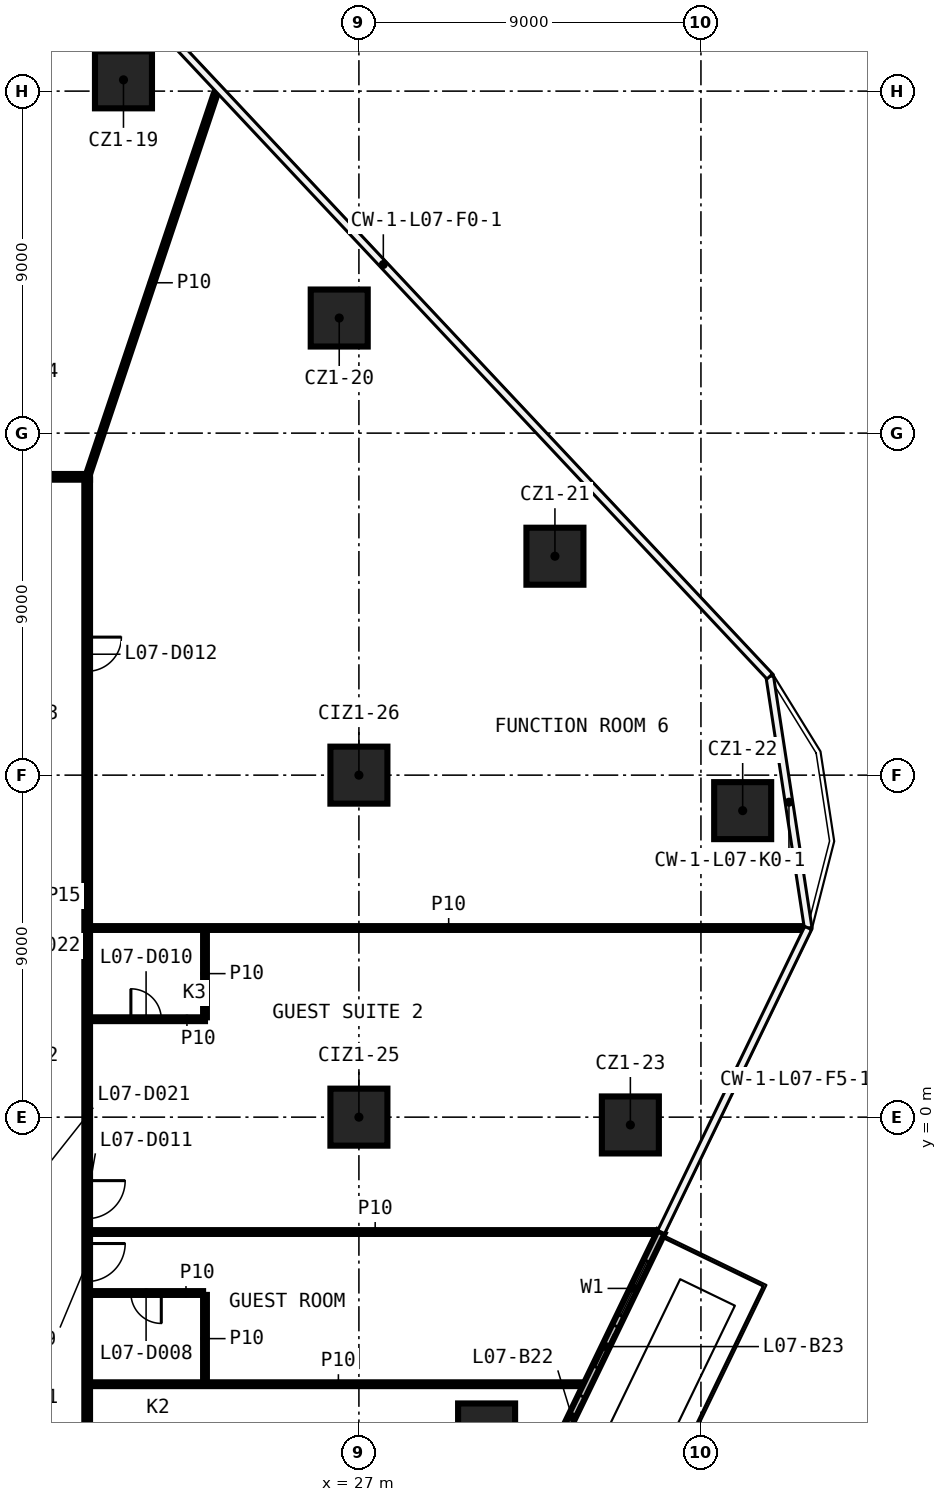
"""IFC4 building model, lengths in metres.
Left out: names, types, materials, properties, quantities, classifications, styles, units other than length and angle.
Written with IfcOpenShell. Run it as: python <this file> out.ifc"""

import sys

from ifc_helpers import new_model, si_unit, direction, frame, frame_2d, origin, origin_2d, place, context, subcontext, project, spatial, rectangle, extrude, element, fill, save


model = new_model("IFC4")
c1 = context("Model", 3, precision=1e-05, world=origin(), true_north=direction((0.0, 1.0)))
c2 = subcontext(c1, "Body", "Model", "MODEL_VIEW")
j1 = project(units=[si_unit("LENGTHUNIT", "METRE"), si_unit("PLANEANGLEUNIT", "RADIAN")], contexts=[c1])
p1 = place(None, origin())
s1 = spatial("IfcSite", under=j1, at=p1, CompositionType="ELEMENT")
p2 = place(p1, origin())
s2 = spatial("IfcBuilding", under=s1, at=p2, CompositionType="ELEMENT")
p3 = place(p2, frame((0.0, 0.0, 47.7)))
s3 = spatial("IfcBuildingStorey", under=s2, at=p3, CompositionType="ELEMENT", Elevation=47.7)
for number, where, z_axis, x_axis in (
    (1, (20.805, 27.297, 0.0), (0.0, 0.0, 1.0), (1.0, 0.0, 0.0)),
    (2, (26.482, 21.029, 0.0), (0.0, 0.0, 1.0), (1.0, 0.0, 0.0)),
    (3, (32.158, 14.761, 0.0), (0.0, 0.0, 1.0), (1.0, 0.0, 0.0)),
    (4, (37.098, 8.066, 0.0), (0.0, 0.0, 1.0), (1.0, 0.0, 0.0)),
    (5, (34.143, -0.205, 0.0), (0.0, 0.0, 1.0), (1.0, 0.0, 0.0)),
    (6, (30.36, -8.284, 0.0), (0.0, 0.0, 1.0), (1.0, 0.0, 0.0)),
    (7, (27.0, 0.0, 0.0), (0.0, 0.0, 1.0), (1.0, 0.0, 0.0)),
    (8, (27.0, 9.0, 0.0), (0.0, 0.0, 1.0), (1.0, 0.0, 0.0)),
):
    element("IfcColumn", number, at=place(p3, frame(where, z_axis=z_axis, x_axis=x_axis)), inside=s3, PredefinedType="COLUMN", context=c2, shape_type="SweptSolid", body=[
        extrude(rectangle(XDim=1.5, YDim=1.5, at=origin_2d()), origin(), (0.0, 0.0, 1.0), 3.3),
    ])
p4 = place(p3, frame((19.925, -7.028, 0.0), z_axis=(0.0, 0.0, 1.0), x_axis=(1.0, 0.0, 0.0)))
e9 = element("IfcWall", 9, at=p4, inside=s3, PredefinedType="PARTITIONING", context=c2, shape_type="SweptSolid", body=[
    extrude(rectangle(XDim=13.071, YDim=0.1, at=frame_2d((6.535, 0.0))), origin(), (0.0, 0.0, 1.0), 3.3),
])
p5 = place(p3, frame((22.9, -4.628, 0.0), z_axis=(0.0, 0.0, 1.0), x_axis=(-1.0, 0.0, 0.0)))
e10 = element("IfcWall", 10, at=p5, inside=s3, PredefinedType="PARTITIONING", context=c2, shape_type="SweptSolid", body=[
    extrude(rectangle(XDim=2.975, YDim=0.1, at=frame_2d((1.487, 0.0))), origin(), (0.0, 0.0, 1.0), 3.3),
])
p6 = place(p5, frame((1.1, 0.0, 0.0)))
e11 = element("IfcOpeningElement", 11, at=p6, cuts=e10, PredefinedType="OPENING", context=c2, shape_type="SweptSolid", body=[
    extrude(rectangle(XDim=0.8, YDim=2.1, at=frame_2d((0.4, 1.05))), frame((0.0, 0.06, 0.0), z_axis=(0.0, -1.0, 0.0), x_axis=(1.0, 0.0, 0.0)), (0.0, 0.0, 1.0), 0.12),
])
p7 = place(p3, frame((19.925, -3.023, 0.0), z_axis=(0.0, 0.0, 1.0), x_axis=(1.0, 0.0, 0.0)))
e12 = element("IfcWall", 12, at=p7, inside=s3, PredefinedType="PARTITIONING", context=c2, shape_type="SweptSolid", body=[
    extrude(rectangle(XDim=15.006, YDim=0.1, at=frame_2d((7.503, 0.0))), origin(), (0.0, 0.0, 1.0), 3.3),
])
p8 = place(p3, frame((19.925, 2.577, 0.0), z_axis=(0.0, 0.0, 1.0), x_axis=(1.0, 0.0, 0.0)))
e13 = element("IfcWall", 13, at=p8, inside=s3, PredefinedType="PARTITIONING", context=c2, shape_type="SweptSolid", body=[
    extrude(rectangle(XDim=3.025, YDim=0.1, at=frame_2d((1.512, 0.0))), origin(), (0.0, 0.0, 1.0), 3.3),
])
p9 = place(p8, frame((1.075, 0.0, 0.0)))
e14 = element("IfcOpeningElement", 14, at=p9, cuts=e13, PredefinedType="OPENING", context=c2, shape_type="SweptSolid", body=[
    extrude(rectangle(XDim=0.8, YDim=2.1, at=frame_2d((0.4, 1.05))), frame((0.0, 0.06, 0.0), z_axis=(0.0, -1.0, 0.0), x_axis=(1.0, 0.0, 0.0)), (0.0, 0.0, 1.0), 0.12),
])
p10 = place(p3, frame((19.925, 4.977, 0.0), z_axis=(0.0, 0.0, 1.0), x_axis=(1.0, 0.0, 0.0)))
e15 = element("IfcWall", 15, at=p10, inside=s3, PredefinedType="PARTITIONING", context=c2, shape_type="SweptSolid", body=[
    extrude(rectangle(XDim=18.874, YDim=0.1, at=frame_2d((9.437, 0.0))), origin(), (0.0, 0.0, 1.0), 3.3),
])
p11 = place(p3, frame((-19.925, 16.85, 0.0), z_axis=(0.0, 0.0, 1.0), x_axis=(1.0, 0.0, 0.0)))
e16 = element("IfcWall", 16, at=p11, inside=s3, PredefinedType="PARTITIONING", context=c2, shape_type="SweptSolid", body=[
    extrude(rectangle(XDim=39.85, YDim=0.15, at=frame_2d((19.925, 0.0))), origin(), (0.0, 0.0, 1.0), 3.3),
])
p12 = place(p11, frame((31.643, 0.0, 0.0)))
e17 = element("IfcOpeningElement", 17, at=p12, cuts=e16, PredefinedType="OPENING", context=c2, shape_type="SweptSolid", body=[
    extrude(rectangle(XDim=0.9, YDim=2.1, at=frame_2d((0.45, 1.05))), frame((0.0, 0.085, 0.0), z_axis=(0.0, -1.0, 0.0), x_axis=(1.0, 0.0, 0.0)), (0.0, 0.0, 1.0), 0.17),
])
p13 = place(p11, frame((22.056, 0.0, 0.0)))
e18 = element("IfcOpeningElement", 18, at=p13, cuts=e16, PredefinedType="OPENING", context=c2, shape_type="SweptSolid", body=[
    extrude(rectangle(XDim=0.9, YDim=2.1, at=frame_2d((0.45, 1.05))), frame((0.0, 0.085, 0.0), z_axis=(0.0, -1.0, 0.0), x_axis=(1.0, 0.0, 0.0)), (0.0, 0.0, 1.0), 0.17),
])
p14 = place(p11, frame((14.831, 0.0, 0.0)))
e19 = element("IfcOpeningElement", 19, at=p14, cuts=e16, PredefinedType="OPENING", context=c2, shape_type="SweptSolid", body=[
    extrude(rectangle(XDim=1.0, YDim=2.1, at=frame_2d((0.5, 1.05))), frame((0.0, 0.085, 0.0), z_axis=(0.0, -1.0, 0.0), x_axis=(1.0, 0.0, 0.0)), (0.0, 0.0, 1.0), 0.17),
])
p15 = place(p3, frame((19.85, 16.85, 0.0), z_axis=(0.0, 0.0, 1.0), x_axis=(0.317967659794, 0.948101559605, 0.0)))
e20 = element("IfcWall", 20, at=p15, inside=s3, PredefinedType="PARTITIONING", context=c2, shape_type="SweptSolid", body=[
    extrude(rectangle(XDim=10.773, YDim=0.1, at=frame_2d((5.387, 0.0))), origin(), (0.0, 0.0, 1.0), 3.3),
])
p16 = place(p3, frame((22.95, -6.978, 0.0), z_axis=(0.0, 0.0, 1.0), x_axis=(0.0, 1.0, 0.0)))
e21 = element("IfcWall", 21, at=p16, inside=s3, PredefinedType="PARTITIONING", context=c2, shape_type="SweptSolid", body=[
    extrude(rectangle(XDim=2.3, YDim=0.1, at=frame_2d((1.15, 0.0))), origin(), (0.0, 0.0, 1.0), 3.3),
])
p17 = place(p3, frame((22.95, 2.627, 0.0), z_axis=(0.0, 0.0, 1.0), x_axis=(0.0, 1.0, 0.0)))
e22 = element("IfcWall", 22, at=p17, inside=s3, PredefinedType="PARTITIONING", context=c2, shape_type="SweptSolid", body=[
    extrude(rectangle(XDim=2.3, YDim=0.1, at=frame_2d((1.15, 0.0))), origin(), (0.0, 0.0, 1.0), 3.3),
])
p18 = place(p3, frame((19.85, 16.775, 0.0), z_axis=(0.0, 0.0, 1.0), x_axis=(0.0, -1.0, 0.0)))
e23 = element("IfcWall", 23, at=p18, inside=s3, PredefinedType="PARTITIONING", context=c2, shape_type="SweptSolid", body=[
    extrude(rectangle(XDim=33.55, YDim=0.15, at=frame_2d((16.775, 0.0))), origin(), (0.0, 0.0, 1.0), 3.3),
])
p19 = place(p18, frame((29.016, 0.0, 0.0)))
e24 = element("IfcOpeningElement", 24, at=p19, cuts=e23, PredefinedType="OPENING", context=c2, shape_type="SweptSolid", body=[
    extrude(rectangle(XDim=1.0, YDim=2.1, at=frame_2d((0.5, 1.05))), frame((0.0, 0.085, 0.0), z_axis=(0.0, -1.0, 0.0), x_axis=(1.0, 0.0, 0.0)), (0.0, 0.0, 1.0), 0.17),
])
p20 = place(p18, frame((20.1, 0.0, 0.0)))
e25 = element("IfcOpeningElement", 25, at=p20, cuts=e23, PredefinedType="OPENING", context=c2, shape_type="SweptSolid", body=[
    extrude(rectangle(XDim=1.0, YDim=2.1, at=frame_2d((0.5, 1.05))), frame((0.0, 0.085, 0.0), z_axis=(0.0, -1.0, 0.0), x_axis=(1.0, 0.0, 0.0)), (0.0, 0.0, 1.0), 0.17),
])
p21 = place(p18, frame((18.446, 0.0, 0.0)))
e26 = element("IfcOpeningElement", 26, at=p21, cuts=e23, PredefinedType="OPENING", context=c2, shape_type="SweptSolid", body=[
    extrude(rectangle(XDim=1.0, YDim=2.1, at=frame_2d((0.5, 1.05))), frame((0.0, 0.085, 0.0), z_axis=(0.0, -1.0, 0.0), x_axis=(1.0, 0.0, 0.0)), (0.0, 0.0, 1.0), 0.17),
])
p22 = place(p18, frame((4.143, 0.0, 0.0)))
e27 = element("IfcOpeningElement", 27, at=p22, cuts=e23, PredefinedType="OPENING", context=c2, shape_type="SweptSolid", body=[
    extrude(rectangle(XDim=0.9, YDim=2.1, at=frame_2d((0.45, 1.05))), frame((0.0, 0.085, 0.0), z_axis=(0.0, -1.0, 0.0), x_axis=(1.0, 0.0, 0.0)), (0.0, 0.0, 1.0), 0.17),
])
p23 = place(p3, frame((23.338, -27.051, 0.0), z_axis=(0.0, 0.0, 1.0), x_axis=(0.43524886879, 0.900310181114, 0.0)))
e28 = element("IfcWall", 28, at=p23, inside=s3, PredefinedType="SOLIDWALL", context=c2, shape_type="SweptSolid", body=[
    extrude(rectangle(XDim=26.689, YDim=0.2, at=frame_2d((13.344, 0.0))), origin(), (0.0, 0.0, 1.0), 3.3),
])
p24 = place(p23, frame((0.5, 0.0, 0.6)))
e29 = element("IfcOpeningElement", 29, at=p24, cuts=e28, PredefinedType="OPENING", context=c2, shape_type="SweptSolid", body=[
    extrude(rectangle(XDim=1.6, YDim=2.4, at=frame_2d((0.8, 1.2))), frame((0.0, 0.11, 0.0), z_axis=(0.0, -1.0, 0.0), x_axis=(1.0, 0.0, 0.0)), (0.0, 0.0, 1.0), 0.22),
])
p25 = place(p23, frame((3.0, 0.0, 0.0)))
e30 = element("IfcOpeningElement", 30, at=p25, cuts=e28, PredefinedType="OPENING", context=c2, shape_type="SweptSolid", body=[
    extrude(rectangle(XDim=1.2, YDim=2.4, at=frame_2d((0.6, 1.2))), frame((0.0, 0.11, 0.0), z_axis=(0.0, -1.0, 0.0), x_axis=(1.0, 0.0, 0.0)), (0.0, 0.0, 1.0), 0.22),
])
p26 = place(p23, frame((6.448, 0.0, 0.6)))
e31 = element("IfcOpeningElement", 31, at=p26, cuts=e28, PredefinedType="OPENING", context=c2, shape_type="SweptSolid", body=[
    extrude(rectangle(XDim=1.6, YDim=2.4, at=frame_2d((0.8, 1.2))), frame((0.0, 0.11, 0.0), z_axis=(0.0, -1.0, 0.0), x_axis=(1.0, 0.0, 0.0)), (0.0, 0.0, 1.0), 0.22),
])
p27 = place(p23, frame((4.948, 0.0, 0.0)))
e32 = element("IfcOpeningElement", 32, at=p27, cuts=e28, PredefinedType="OPENING", context=c2, shape_type="SweptSolid", body=[
    extrude(rectangle(XDim=1.2, YDim=2.4, at=frame_2d((0.6, 1.2))), frame((0.0, 0.11, 0.0), z_axis=(0.0, -1.0, 0.0), x_axis=(1.0, 0.0, 0.0)), (0.0, 0.0, 1.0), 0.22),
])
p28 = place(p23, frame((9.396, 0.0, 0.6)))
e33 = element("IfcOpeningElement", 33, at=p28, cuts=e28, PredefinedType="OPENING", context=c2, shape_type="SweptSolid", body=[
    extrude(rectangle(XDim=1.6, YDim=2.4, at=frame_2d((0.8, 1.2))), frame((0.0, 0.11, 0.0), z_axis=(0.0, -1.0, 0.0), x_axis=(1.0, 0.0, 0.0)), (0.0, 0.0, 1.0), 0.22),
])
p29 = place(p23, frame((11.896, 0.0, 0.0)))
e34 = element("IfcOpeningElement", 34, at=p29, cuts=e28, PredefinedType="OPENING", context=c2, shape_type="SweptSolid", body=[
    extrude(rectangle(XDim=1.2, YDim=2.4, at=frame_2d((0.6, 1.2))), frame((0.0, 0.11, 0.0), z_axis=(0.0, -1.0, 0.0), x_axis=(1.0, 0.0, 0.0)), (0.0, 0.0, 1.0), 0.22),
])
p30 = place(p23, frame((15.344, 0.0, 0.6)))
e35 = element("IfcOpeningElement", 35, at=p30, cuts=e28, PredefinedType="OPENING", context=c2, shape_type="SweptSolid", body=[
    extrude(rectangle(XDim=1.6, YDim=2.4, at=frame_2d((0.8, 1.2))), frame((0.0, 0.11, 0.0), z_axis=(0.0, -1.0, 0.0), x_axis=(1.0, 0.0, 0.0)), (0.0, 0.0, 1.0), 0.22),
])
p31 = place(p23, frame((13.844, 0.0, 0.0)))
e36 = element("IfcOpeningElement", 36, at=p31, cuts=e28, PredefinedType="OPENING", context=c2, shape_type="SweptSolid", body=[
    extrude(rectangle(XDim=1.2, YDim=2.4, at=frame_2d((0.6, 1.2))), frame((0.0, 0.11, 0.0), z_axis=(0.0, -1.0, 0.0), x_axis=(1.0, 0.0, 0.0)), (0.0, 0.0, 1.0), 0.22),
])
p32 = place(p23, frame((18.292, 0.0, 0.6)))
e37 = element("IfcOpeningElement", 37, at=p32, cuts=e28, PredefinedType="OPENING", context=c2, shape_type="SweptSolid", body=[
    extrude(rectangle(XDim=1.6, YDim=2.4, at=frame_2d((0.8, 1.2))), frame((0.0, 0.11, 0.0), z_axis=(0.0, -1.0, 0.0), x_axis=(1.0, 0.0, 0.0)), (0.0, 0.0, 1.0), 0.22),
])
p33 = place(p23, frame((20.692, 0.0, 0.0)))
e38 = element("IfcOpeningElement", 38, at=p33, cuts=e28, PredefinedType="OPENING", context=c2, shape_type="SweptSolid", body=[
    extrude(rectangle(XDim=1.2, YDim=2.4, at=frame_2d((0.6, 1.2))), frame((0.0, 0.11, 0.0), z_axis=(0.0, -1.0, 0.0), x_axis=(1.0, 0.0, 0.0)), (0.0, 0.0, 1.0), 0.22),
])
p34 = place(p23, frame((24.24, 0.0, 0.6)))
e39 = element("IfcOpeningElement", 39, at=p34, cuts=e28, PredefinedType="OPENING", context=c2, shape_type="SweptSolid", body=[
    extrude(rectangle(XDim=1.6, YDim=2.4, at=frame_2d((0.8, 1.2))), frame((0.0, 0.11, 0.0), z_axis=(0.0, -1.0, 0.0), x_axis=(1.0, 0.0, 0.0)), (0.0, 0.0, 1.0), 0.22),
])
p35 = place(p23, frame((22.74, 0.0, 0.0)))
e40 = element("IfcOpeningElement", 40, at=p35, cuts=e28, PredefinedType="OPENING", context=c2, shape_type="SweptSolid", body=[
    extrude(rectangle(XDim=1.2, YDim=2.4, at=frame_2d((0.6, 1.2))), frame((0.0, 0.11, 0.0), z_axis=(0.0, -1.0, 0.0), x_axis=(1.0, 0.0, 0.0)), (0.0, 0.0, 1.0), 0.22),
])
p36 = place(p6, origin())
e41 = element("IfcDoor", 41, at=p36, inside=s3, OperationType="SINGLE_SWING_LEFT", PredefinedType="DOOR", context=c2, shape_type="SweptSolid", body=[
    extrude(rectangle(XDim=0.8, YDim=2.1, at=frame_2d((0.4, 1.05))), frame((0.0, 0.025, 0.0), z_axis=(0.0, -1.0, 0.0), x_axis=(1.0, 0.0, 0.0)), (0.0, 0.0, 1.0), 0.05),
])
fill(e11, e41)
p37 = place(p20, origin())
e42 = element("IfcDoor", 42, at=p37, inside=s3, OperationType="SINGLE_SWING_RIGHT", PredefinedType="DOOR", context=c2, shape_type="SweptSolid", body=[
    extrude(rectangle(XDim=1.0, YDim=2.1, at=frame_2d((0.5, 1.05))), frame((0.0, 0.025, 0.0), z_axis=(0.0, -1.0, 0.0), x_axis=(1.0, 0.0, 0.0)), (0.0, 0.0, 1.0), 0.05),
])
fill(e25, e42)
p38 = place(p9, origin())
e43 = element("IfcDoor", 43, at=p38, inside=s3, OperationType="SINGLE_SWING_RIGHT", PredefinedType="DOOR", context=c2, shape_type="SweptSolid", body=[
    extrude(rectangle(XDim=0.8, YDim=2.1, at=frame_2d((0.4, 1.05))), frame((0.0, 0.025, 0.0), z_axis=(0.0, -1.0, 0.0), x_axis=(1.0, 0.0, 0.0)), (0.0, 0.0, 1.0), 0.05),
])
fill(e14, e43)
p39 = place(p21, origin())
e44 = element("IfcDoor", 44, at=p39, inside=s3, OperationType="SINGLE_SWING_LEFT", PredefinedType="DOOR", context=c2, shape_type="SweptSolid", body=[
    extrude(rectangle(XDim=1.0, YDim=2.1, at=frame_2d((0.5, 1.05))), frame((0.0, 0.025, 0.0), z_axis=(0.0, -1.0, 0.0), x_axis=(1.0, 0.0, 0.0)), (0.0, 0.0, 1.0), 0.05),
])
fill(e26, e44)
p40 = place(p22, origin())
e45 = element("IfcDoor", 45, at=p40, inside=s3, OperationType="SINGLE_SWING_RIGHT", PredefinedType="DOOR", context=c2, shape_type="SweptSolid", body=[
    extrude(rectangle(XDim=0.9, YDim=2.1, at=frame_2d((0.45, 1.05))), frame((0.0, 0.025, 0.0), z_axis=(0.0, -1.0, 0.0), x_axis=(1.0, 0.0, 0.0)), (0.0, 0.0, 1.0), 0.05),
])
fill(e27, e45)
p41 = place(p33, origin())
e46 = element("IfcDoor", 46, at=p41, inside=s3, OperationType="SLIDING_TO_LEFT", PredefinedType="DOOR", context=c2, shape_type="SweptSolid", body=[
    extrude(rectangle(XDim=1.2, YDim=2.4, at=frame_2d((0.6, 1.2))), frame((0.0, 0.025, 0.0), z_axis=(0.0, -1.0, 0.0), x_axis=(1.0, 0.0, 0.0)), (0.0, 0.0, 1.0), 0.05),
])
fill(e38, e46)
p42 = place(p34, origin())
e47 = element("IfcWindow", 47, at=p42, inside=s3, PartitioningType="SINGLE_PANEL", PredefinedType="WINDOW", context=c2, shape_type="SweptSolid", body=[
    extrude(rectangle(XDim=1.6, YDim=2.4, at=frame_2d((0.8, 1.2))), frame((0.0, 0.03, 0.0), z_axis=(0.0, -1.0, 0.0), x_axis=(1.0, 0.0, 0.0)), (0.0, 0.0, 1.0), 0.06),
])
fill(e39, e47)
p43 = place(p35, origin())
e48 = element("IfcDoor", 48, at=p43, inside=s3, OperationType="SLIDING_TO_LEFT", PredefinedType="DOOR", context=c2, shape_type="SweptSolid", body=[
    extrude(rectangle(XDim=1.2, YDim=2.4, at=frame_2d((0.6, 1.2))), frame((0.0, 0.025, 0.0), z_axis=(0.0, -1.0, 0.0), x_axis=(1.0, 0.0, 0.0)), (0.0, 0.0, 1.0), 0.05),
])
fill(e40, e48)
save(model, sys.argv[1])
